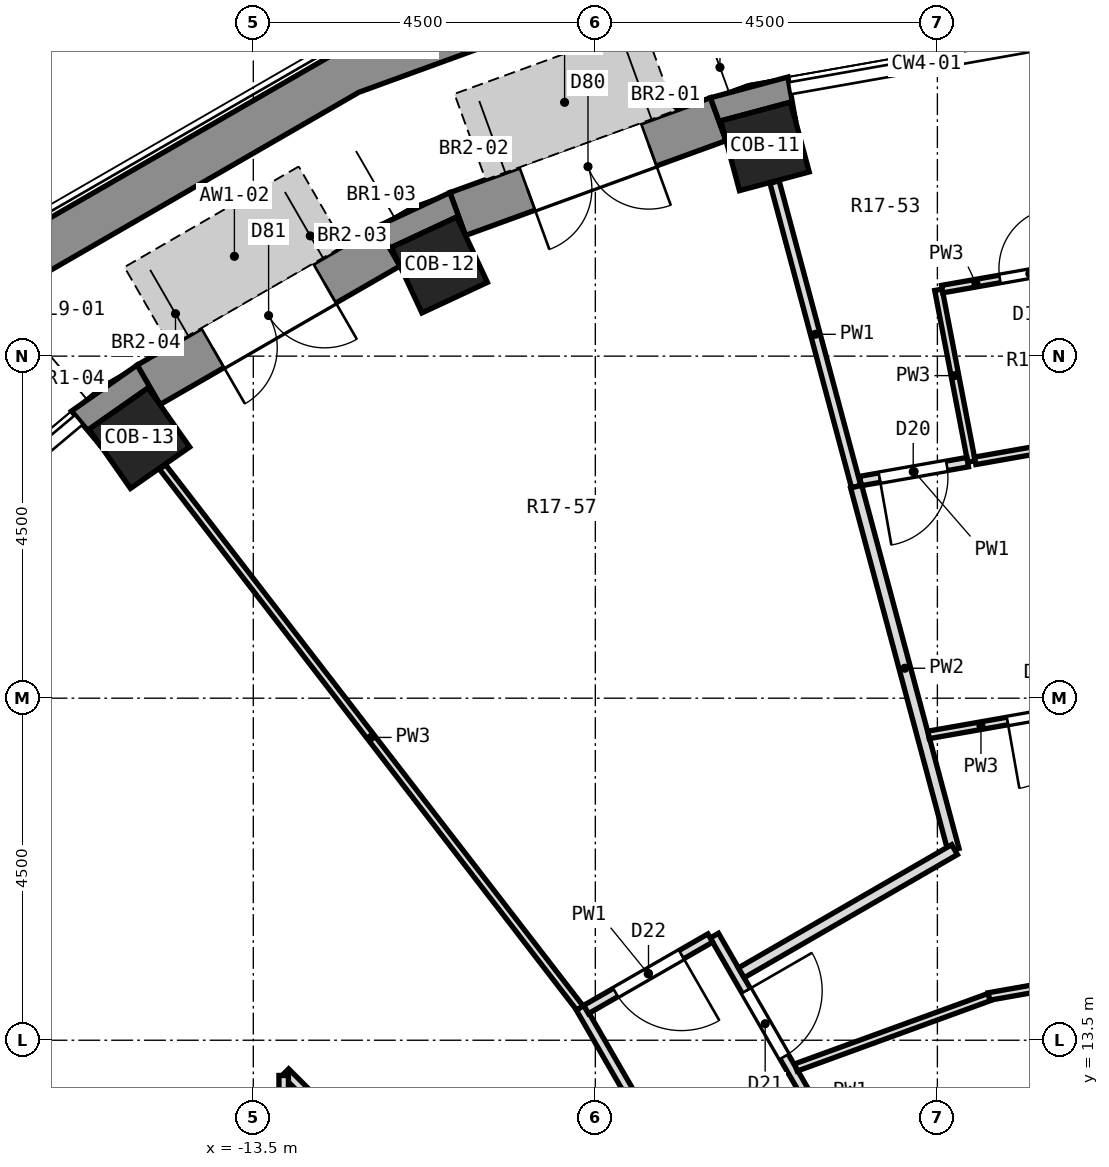
"""IFC4 building model, lengths in metres.
Left out: names, types, materials, properties, quantities, classifications, styles, units other than length and angle.
Written with IfcOpenShell. Run it as: python <this file> out.ifc"""

import sys

from ifc_helpers import new_model, si_unit, direction, frame, frame_2d, origin, origin_2d, place, context, subcontext, project, spatial, polyline, rectangle, outline, extrude, element, fill, save


model = new_model("IFC4")
c1 = context("Model", 3, precision=1e-05, world=origin(), true_north=direction((0.0, 1.0)))
c2 = subcontext(c1, "Body", "Model", "MODEL_VIEW")
j1 = project(units=[si_unit("LENGTHUNIT", "METRE"), si_unit("PLANEANGLEUNIT", "RADIAN")], contexts=[c1])
p1 = place(None, origin())
s1 = spatial("IfcSite", under=j1, at=p1, CompositionType="ELEMENT")
p2 = place(p1, origin())
s2 = spatial("IfcBuilding", under=s1, at=p2, CompositionType="ELEMENT")
p3 = place(p2, frame((0.0, 0.0, 91.9)))
s3 = spatial("IfcBuildingStorey", under=s2, at=p3, CompositionType="ELEMENT", Elevation=91.9)
for number, where, z_axis, x_axis in (
    (1, (-6.768, 25.259, 0.0), (0.0, 0.0, 1.0), (-0.259, 0.966, 0.0)),
    (2, (-11.052, 23.7, 0.0), (0.0, 0.0, 1.0), (-0.423, 0.906, 0.0)),
    (3, (-14.999, 21.421, 0.0), (0.0, 0.0, 1.0), (-0.574, 0.819, 0.0)),
):
    element("IfcColumn", number, at=place(p3, frame(where, z_axis=z_axis, x_axis=x_axis)), inside=s3, PredefinedType="COLUMN", context=c2, shape_type="SweptSolid", body=[
        extrude(rectangle(XDim=0.95, YDim=0.95, at=origin_2d()), origin(), (0.0, 0.0, 1.0), 3.3),
    ])
p4 = place(p3, frame((-7.383, 25.617, 0.0), z_axis=(0.0, 0.0, 1.0), x_axis=(-0.939703505393, -0.341990236633, 0.0)))
e4 = element("IfcWall", 4, at=p4, inside=s3, PredefinedType="SOLIDWALL", context=c2, shape_type="SweptSolid", body=[
    extrude(rectangle(XDim=3.648, YDim=0.6, at=frame_2d((1.824, 0.0))), origin(), (0.0, 0.0, 1.0), 2.8),
])
p5 = place(p4, frame((0.974, 0.0, 0.0)))
e5 = element("IfcOpeningElement", 5, at=p5, cuts=e4, PredefinedType="OPENING", context=c2, shape_type="SweptSolid", body=[
    extrude(rectangle(XDim=1.7, YDim=2.4, at=frame_2d((0.85, 1.2))), frame((0.0, 0.312, 0.0), z_axis=(0.0, -1.0, 0.0), x_axis=(1.0, 0.0, 0.0)), (0.0, 0.0, 1.0), 0.624),
])
p6 = place(p3, frame((-11.719, 23.946, 0.0), z_axis=(0.0, 0.0, 1.0), x_axis=(-0.866051847062, -0.499954196102, 0.0)))
e6 = element("IfcWall", 6, at=p6, inside=s3, PredefinedType="SOLIDWALL", context=c2, shape_type="SweptSolid", body=[
    extrude(rectangle(XDim=3.648, YDim=0.6, at=frame_2d((1.824, 0.0))), origin(), (0.0, 0.0, 1.0), 2.8),
])
p7 = place(p6, frame((0.974, 0.0, 0.0)))
e7 = element("IfcOpeningElement", 7, at=p7, cuts=e6, PredefinedType="OPENING", context=c2, shape_type="SweptSolid", body=[
    extrude(rectangle(XDim=1.7, YDim=2.4, at=frame_2d((0.85, 1.2))), frame((0.0, 0.312, 0.0), z_axis=(0.0, -1.0, 0.0), x_axis=(1.0, 0.0, 0.0)), (0.0, 0.0, 1.0), 0.624),
])
p8 = place(p3, origin())
e8 = element("IfcWall", 8, at=p8, inside=s3, PredefinedType="SOLIDWALL", context=c2, shape_type="SweptSolid", body=[
    extrude(outline(polyline([(-6.467, 26.172), (-7.486, 25.899), (-7.28, 25.335), (-7.35, 25.595), (-6.432, 25.841), (-6.363, 25.581), (-6.467, 26.172)])), origin(), (0.0, 0.0, 1.0), 2.8),
])
p9 = place(p3, origin())
e9 = element("IfcWall", 9, at=p9, inside=s3, PredefinedType="SOLIDWALL", context=c2, shape_type="SweptSolid", body=[
    extrude(outline(polyline([(-10.913, 24.651), (-11.869, 24.206), (-11.569, 23.686), (-11.683, 23.93), (-10.822, 24.331), (-10.708, 24.087), (-10.913, 24.651)])), origin(), (0.0, 0.0, 1.0), 2.8),
])
p10 = place(p3, origin())
e10 = element("IfcWall", 10, at=p10, inside=s3, PredefinedType="SOLIDWALL", context=c2, shape_type="SweptSolid", body=[
    extrude(outline(polyline([(-15.892, 21.777), (-15.506, 21.317), (-15.661, 21.538), (-14.882, 22.083), (-14.728, 21.862), (-15.028, 22.382), (-15.892, 21.777)])), origin(), (0.0, 0.0, 1.0), 2.8),
])
p11 = place(p3, origin())
e11 = element("IfcWall", 11, at=p11, inside=s3, PredefinedType="PARAPET", context=c2, shape_type="SweptSolid", body=[
    extrude(outline(polyline([(-7.573, 28.262), (-12.365, 26.517), (-16.782, 23.967), (-16.437, 23.474), (-12.111, 25.971), (-7.417, 27.68), (-7.573, 28.262)])), origin(), (0.0, 0.0, 1.0), 0.5),
])
p12 = place(p3, frame((-4.486, 23.373, 0.0), z_axis=(0.0, 0.0, 1.0), x_axis=(0.188701744684, -0.982034445197, 0.0)))
e12 = element("IfcWall", 12, at=p12, inside=s3, PredefinedType="PARTITIONING", context=c2, shape_type="SweptSolid", body=[
    extrude(rectangle(XDim=2.3, YDim=0.1, at=frame_2d((1.15, 0.0))), origin(), (0.0, 0.0, 1.0), 2.8),
])
p13 = place(p3, frame((-6.642, 24.791, 0.0), z_axis=(0.0, 0.0, 1.0), x_axis=(0.258787077678, -0.965934391368, 0.0)))
e13 = element("IfcWall", 13, at=p13, inside=s3, PredefinedType="PARTITIONING", context=c2, shape_type="SweptSolid", body=[
    extrude(rectangle(XDim=4.148, YDim=0.125, at=frame_2d((2.074, 0.0))), origin(), (0.0, 0.0, 1.0), 2.8),
])
p14 = place(p3, frame((-5.569, 20.784, 0.0), z_axis=(0.0, 0.0, 1.0), x_axis=(0.258810886784, -0.965928012267, 0.0)))
e14 = element("IfcWall", 14, at=p14, inside=s3, PredefinedType="PARTITIONING", context=c2, shape_type="SweptSolid", body=[
    extrude(rectangle(XDim=4.949, YDim=0.15, at=frame_2d((2.474, 0.0))), origin(), (0.0, 0.0, 1.0), 2.8),
])
p15 = place(p3, frame((-9.197, 13.93, 0.0), z_axis=(0.0, 0.0, 1.0), x_axis=(0.499811918813, -0.86613396528, 0.0)))
e15 = element("IfcWall", 15, at=p15, inside=s3, PredefinedType="PARTITIONING", context=c2, shape_type="SweptSolid", body=[
    extrude(rectangle(XDim=5.67, YDim=0.125, at=frame_2d((2.835, 0.0))), origin(), (0.0, 0.0, 1.0), 2.8),
])
p16 = place(p3, frame((-7.434, 14.876, 0.0), z_axis=(0.0, 0.0, 1.0), x_axis=(0.499750096908, -0.866169637335, 0.0)))
e16 = element("IfcWall", 16, at=p16, inside=s3, PredefinedType="PARTITIONING", context=c2, shape_type="SweptSolid", body=[
    extrude(rectangle(XDim=5.607, YDim=0.125, at=frame_2d((2.803, 0.0))), origin(), (0.0, 0.0, 1.0), 2.8),
])
p17 = place(p16, frame((0.837, 0.0, 0.0)))
e17 = element("IfcOpeningElement", 17, at=p17, cuts=e16, PredefinedType="OPENING", context=c2, shape_type="SweptSolid", body=[
    extrude(rectangle(XDim=1.0, YDim=2.1, at=frame_2d((0.5, 1.05))), frame((0.0, 0.074, 0.0), z_axis=(0.0, -1.0, 0.0), x_axis=(1.0, 0.0, 0.0)), (0.0, 0.0, 1.0), 0.149),
])
p18 = place(p3, frame((-14.694, 21.042, 0.0), z_axis=(0.0, 0.0, 1.0), x_axis=(0.610804913832, -0.79178112963, 0.0)))
e18 = element("IfcWall", 18, at=p18, inside=s3, PredefinedType="PARTITIONING", context=c2, shape_type="SweptSolid", body=[
    extrude(rectangle(XDim=8.989, YDim=0.1, at=frame_2d((4.494, 0.0))), origin(), (0.0, 0.0, 1.0), 2.8),
])
p19 = place(p3, frame((-13.079, 13.079, 0.0), z_axis=(0.0, 0.0, 1.0), x_axis=(0.707106781187, -0.707106781187, 0.0)))
e19 = element("IfcWall", 19, at=p19, inside=s3, PredefinedType="PARTITIONING", context=c2, shape_type="SweptSolid", body=[
    extrude(rectangle(XDim=4.242, YDim=0.125, at=frame_2d((2.121, 0.0))), origin(), (0.0, 0.0, 1.0), 2.8),
])
p20 = place(p3, frame((-3.824, 14.075, 0.0), z_axis=(0.0, 0.0, 1.0), x_axis=(0.984827998664, 0.173533319706, 0.0)))
e20 = element("IfcWall", 20, at=p20, inside=s3, PredefinedType="PARTITIONING", context=c2, shape_type="SweptSolid", body=[
    extrude(rectangle(XDim=2.542, YDim=0.1, at=frame_2d((1.271, 0.0))), origin(), (0.0, 0.0, 1.0), 2.8),
])
p21 = place(p3, frame((-4.616, 17.517, 0.0), z_axis=(0.0, 0.0, 1.0), x_axis=(0.984849913621, 0.173408903003, 0.0)))
e21 = element("IfcWall", 21, at=p21, inside=s3, PredefinedType="PARTITIONING", context=c2, shape_type="SweptSolid", body=[
    extrude(rectangle(XDim=3.034, YDim=0.1, at=frame_2d((1.517, 0.0))), origin(), (0.0, 0.0, 1.0), 2.8),
])
p22 = place(p21, frame((1.054, 0.0, 0.0)))
e22 = element("IfcOpeningElement", 22, at=p22, cuts=e21, PredefinedType="OPENING", context=c2, shape_type="SweptSolid", body=[
    extrude(rectangle(XDim=0.9, YDim=2.1, at=frame_2d((0.45, 1.05))), frame((0.0, 0.062, 0.0), z_axis=(0.0, -1.0, 0.0), x_axis=(1.0, 0.0, 0.0)), (0.0, 0.0, 1.0), 0.124),
])
p23 = place(p3, frame((-4.003, 21.123, 0.0), z_axis=(0.0, 0.0, 1.0), x_axis=(0.984804573467, 0.173666208797, 0.0)))
e23 = element("IfcWall", 23, at=p23, inside=s3, PredefinedType="PARTITIONING", context=c2, shape_type="SweptSolid", body=[
    extrude(rectangle(XDim=2.104, YDim=0.1, at=frame_2d((1.052, 0.0))), origin(), (0.0, 0.0, 1.0), 2.8),
])
p24 = place(p3, frame((-5.511, 20.857, 0.0), z_axis=(0.0, 0.0, 1.0), x_axis=(0.984845301527, 0.173435094659, 0.0)))
e24 = element("IfcWall", 24, at=p24, inside=s3, PredefinedType="PARTITIONING", context=c2, shape_type="SweptSolid", body=[
    extrude(rectangle(XDim=1.432, YDim=0.125, at=frame_2d((0.716, 0.0))), origin(), (0.0, 0.0, 1.0), 2.8),
])
p25 = place(p24, frame((0.254, 0.0, 0.0)))
e25 = element("IfcOpeningElement", 25, at=p25, cuts=e24, PredefinedType="OPENING", context=c2, shape_type="SweptSolid", body=[
    extrude(rectangle(XDim=0.9, YDim=2.1, at=frame_2d((0.45, 1.05))), frame((0.0, 0.074, 0.0), z_axis=(0.0, -1.0, 0.0), x_axis=(1.0, 0.0, 0.0)), (0.0, 0.0, 1.0), 0.149),
])
p26 = place(p3, frame((-4.437, 23.382, 0.0), z_axis=(0.0, 0.0, 1.0), x_axis=(0.984790907087, 0.173743688574, 0.0)))
e26 = element("IfcWall", 26, at=p26, inside=s3, PredefinedType="PARTITIONING", context=c2, shape_type="SweptSolid", body=[
    extrude(rectangle(XDim=2.341, YDim=0.1, at=frame_2d((1.17, 0.0))), origin(), (0.0, 0.0, 1.0), 2.8),
])
p27 = place(p26, frame((0.771, 0.0, 0.0)))
e27 = element("IfcOpeningElement", 27, at=p27, cuts=e26, PredefinedType="OPENING", context=c2, shape_type="SweptSolid", body=[
    extrude(rectangle(XDim=0.8, YDim=2.1, at=frame_2d((0.4, 1.05))), frame((0.0, 0.062, 0.0), z_axis=(0.0, -1.0, 0.0), x_axis=(1.0, 0.0, 0.0)), (0.0, 0.0, 1.0), 0.124),
])
p28 = place(p3, frame((-6.361, 13.141, 0.0), z_axis=(0.0, 0.0, 1.0), x_axis=(0.939569098227, 0.342359328275, 0.0)))
e28 = element("IfcWall", 28, at=p28, inside=s3, PredefinedType="PARTITIONING", context=c2, shape_type="SweptSolid", body=[
    extrude(rectangle(XDim=2.703, YDim=0.1, at=frame_2d((1.352, 0.0))), origin(), (0.0, 0.0, 1.0), 2.8),
])
p29 = place(p3, frame((-9.122, 13.904, 0.0), z_axis=(0.0, 0.0, 1.0), x_axis=(0.866620759959, 0.498967392128, 0.0)))
e29 = element("IfcWall", 29, at=p29, inside=s3, PredefinedType="PARTITIONING", context=c2, shape_type="SweptSolid", body=[
    extrude(rectangle(XDim=1.885, YDim=0.125, at=frame_2d((0.943, 0.0))), origin(), (0.0, 0.0, 1.0), 2.8),
])
p30 = place(p29, frame((0.448, 0.0, 0.0)))
e30 = element("IfcOpeningElement", 30, at=p30, cuts=e29, PredefinedType="OPENING", context=c2, shape_type="SweptSolid", body=[
    extrude(rectangle(XDim=1.0, YDim=2.1, at=frame_2d((0.5, 1.05))), frame((0.0, 0.074, 0.0), z_axis=(0.0, -1.0, 0.0), x_axis=(1.0, 0.0, 0.0)), (0.0, 0.0, 1.0), 0.149),
])
p31 = place(p3, frame((-7.08, 14.387, 0.0), z_axis=(0.0, 0.0, 1.0), x_axis=(0.865957178428, 0.500118151169, 0.0)))
e31 = element("IfcWall", 31, at=p31, inside=s3, PredefinedType="PARTITIONING", context=c2, shape_type="SweptSolid", body=[
    extrude(rectangle(XDim=3.24, YDim=0.15, at=frame_2d((1.62, 0.0))), origin(), (0.0, 0.0, 1.0), 2.8),
])
p32 = place(p3, frame((-13.1, 9.4, 0.0), z_axis=(0.0, 0.0, 1.0), x_axis=(0.0, 1.0, 0.0)))
e32 = element("IfcWall", 32, at=p32, inside=s3, PredefinedType="PARTITIONING", context=c2, shape_type="SweptSolid", body=[
    extrude(rectangle(XDim=3.637, YDim=0.125, at=frame_2d((1.818, 0.0))), origin(), (0.0, 0.0, 1.0), 2.8),
])
p33 = place(p32, frame((1.399, 0.0, 0.0)))
e33 = element("IfcOpeningElement", 33, at=p33, cuts=e32, PredefinedType="OPENING", context=c2, shape_type="SweptSolid", body=[
    extrude(rectangle(XDim=0.9, YDim=2.1, at=frame_2d((0.45, 1.05))), frame((0.0, 0.074, 0.0), z_axis=(0.0, -1.0, 0.0), x_axis=(1.0, 0.0, 0.0)), (0.0, 0.0, 1.0), 0.149),
])
p34 = place(p5, origin())
e34 = element("IfcDoor", 34, at=p34, inside=s3, OperationType="DOUBLE_DOOR_SINGLE_SWING", PredefinedType="DOOR", context=c2, shape_type="SweptSolid", body=[
    extrude(rectangle(XDim=1.7, YDim=2.4, at=frame_2d((0.85, 1.2))), frame((0.0, 0.125, 0.0), z_axis=(0.0, -1.0, 0.0), x_axis=(1.0, 0.0, 0.0)), (0.0, 0.0, 1.0), 0.05),
])
fill(e5, e34)
p35 = place(p7, origin())
e35 = element("IfcDoor", 35, at=p35, inside=s3, OperationType="DOUBLE_DOOR_SINGLE_SWING", PredefinedType="DOOR", context=c2, shape_type="SweptSolid", body=[
    extrude(rectangle(XDim=1.7, YDim=2.4, at=frame_2d((0.85, 1.2))), frame((0.0, 0.125, 0.0), z_axis=(0.0, -1.0, 0.0), x_axis=(1.0, 0.0, 0.0)), (0.0, 0.0, 1.0), 0.05),
])
fill(e7, e35)
p36 = place(p27, origin())
e36 = element("IfcDoor", 36, at=p36, inside=s3, OperationType="SINGLE_SWING_RIGHT", PredefinedType="DOOR", context=c2, shape_type="SweptSolid", body=[
    extrude(rectangle(XDim=0.8, YDim=2.1, at=frame_2d((0.4, 1.05))), frame((0.0, 0.025, 0.0), z_axis=(0.0, -1.0, 0.0), x_axis=(1.0, 0.0, 0.0)), (0.0, 0.0, 1.0), 0.05),
])
fill(e27, e36)
p37 = place(p22, frame((0.9, 0.0, 0.0), z_axis=(0.0, 0.0, 1.0), x_axis=(-1.0, 0.0, 0.0)))
e37 = element("IfcDoor", 37, at=p37, inside=s3, OperationType="SINGLE_SWING_RIGHT", PredefinedType="DOOR", context=c2, shape_type="SweptSolid", body=[
    extrude(rectangle(XDim=0.9, YDim=2.1, at=frame_2d((0.45, 1.05))), frame((0.0, 0.025, 0.0), z_axis=(0.0, -1.0, 0.0), x_axis=(1.0, 0.0, 0.0)), (0.0, 0.0, 1.0), 0.05),
])
fill(e22, e37)
p38 = place(p25, frame((0.9, 0.0, 0.0), z_axis=(0.0, 0.0, 1.0), x_axis=(-1.0, 0.0, 0.0)))
e38 = element("IfcDoor", 38, at=p38, inside=s3, OperationType="SINGLE_SWING_RIGHT", PredefinedType="DOOR", context=c2, shape_type="SweptSolid", body=[
    extrude(rectangle(XDim=0.9, YDim=2.1, at=frame_2d((0.45, 1.05))), frame((0.0, 0.025, 0.0), z_axis=(0.0, -1.0, 0.0), x_axis=(1.0, 0.0, 0.0)), (0.0, 0.0, 1.0), 0.05),
])
fill(e25, e38)
p39 = place(p17, origin())
e39 = element("IfcDoor", 39, at=p39, inside=s3, OperationType="SINGLE_SWING_LEFT", PredefinedType="DOOR", context=c2, shape_type="SweptSolid", body=[
    extrude(rectangle(XDim=1.0, YDim=2.1, at=frame_2d((0.5, 1.05))), frame((0.0, 0.025, 0.0), z_axis=(0.0, -1.0, 0.0), x_axis=(1.0, 0.0, 0.0)), (0.0, 0.0, 1.0), 0.05),
])
fill(e17, e39)
p40 = place(p30, frame((1.0, 0.0, 0.0), z_axis=(0.0, 0.0, 1.0), x_axis=(-1.0, 0.0, 0.0)))
e40 = element("IfcDoor", 40, at=p40, inside=s3, OperationType="SINGLE_SWING_LEFT", PredefinedType="DOOR", context=c2, shape_type="SweptSolid", body=[
    extrude(rectangle(XDim=1.0, YDim=2.1, at=frame_2d((0.5, 1.05))), frame((0.0, 0.025, 0.0), z_axis=(0.0, -1.0, 0.0), x_axis=(1.0, 0.0, 0.0)), (0.0, 0.0, 1.0), 0.05),
])
fill(e30, e40)
save(model, sys.argv[1])
